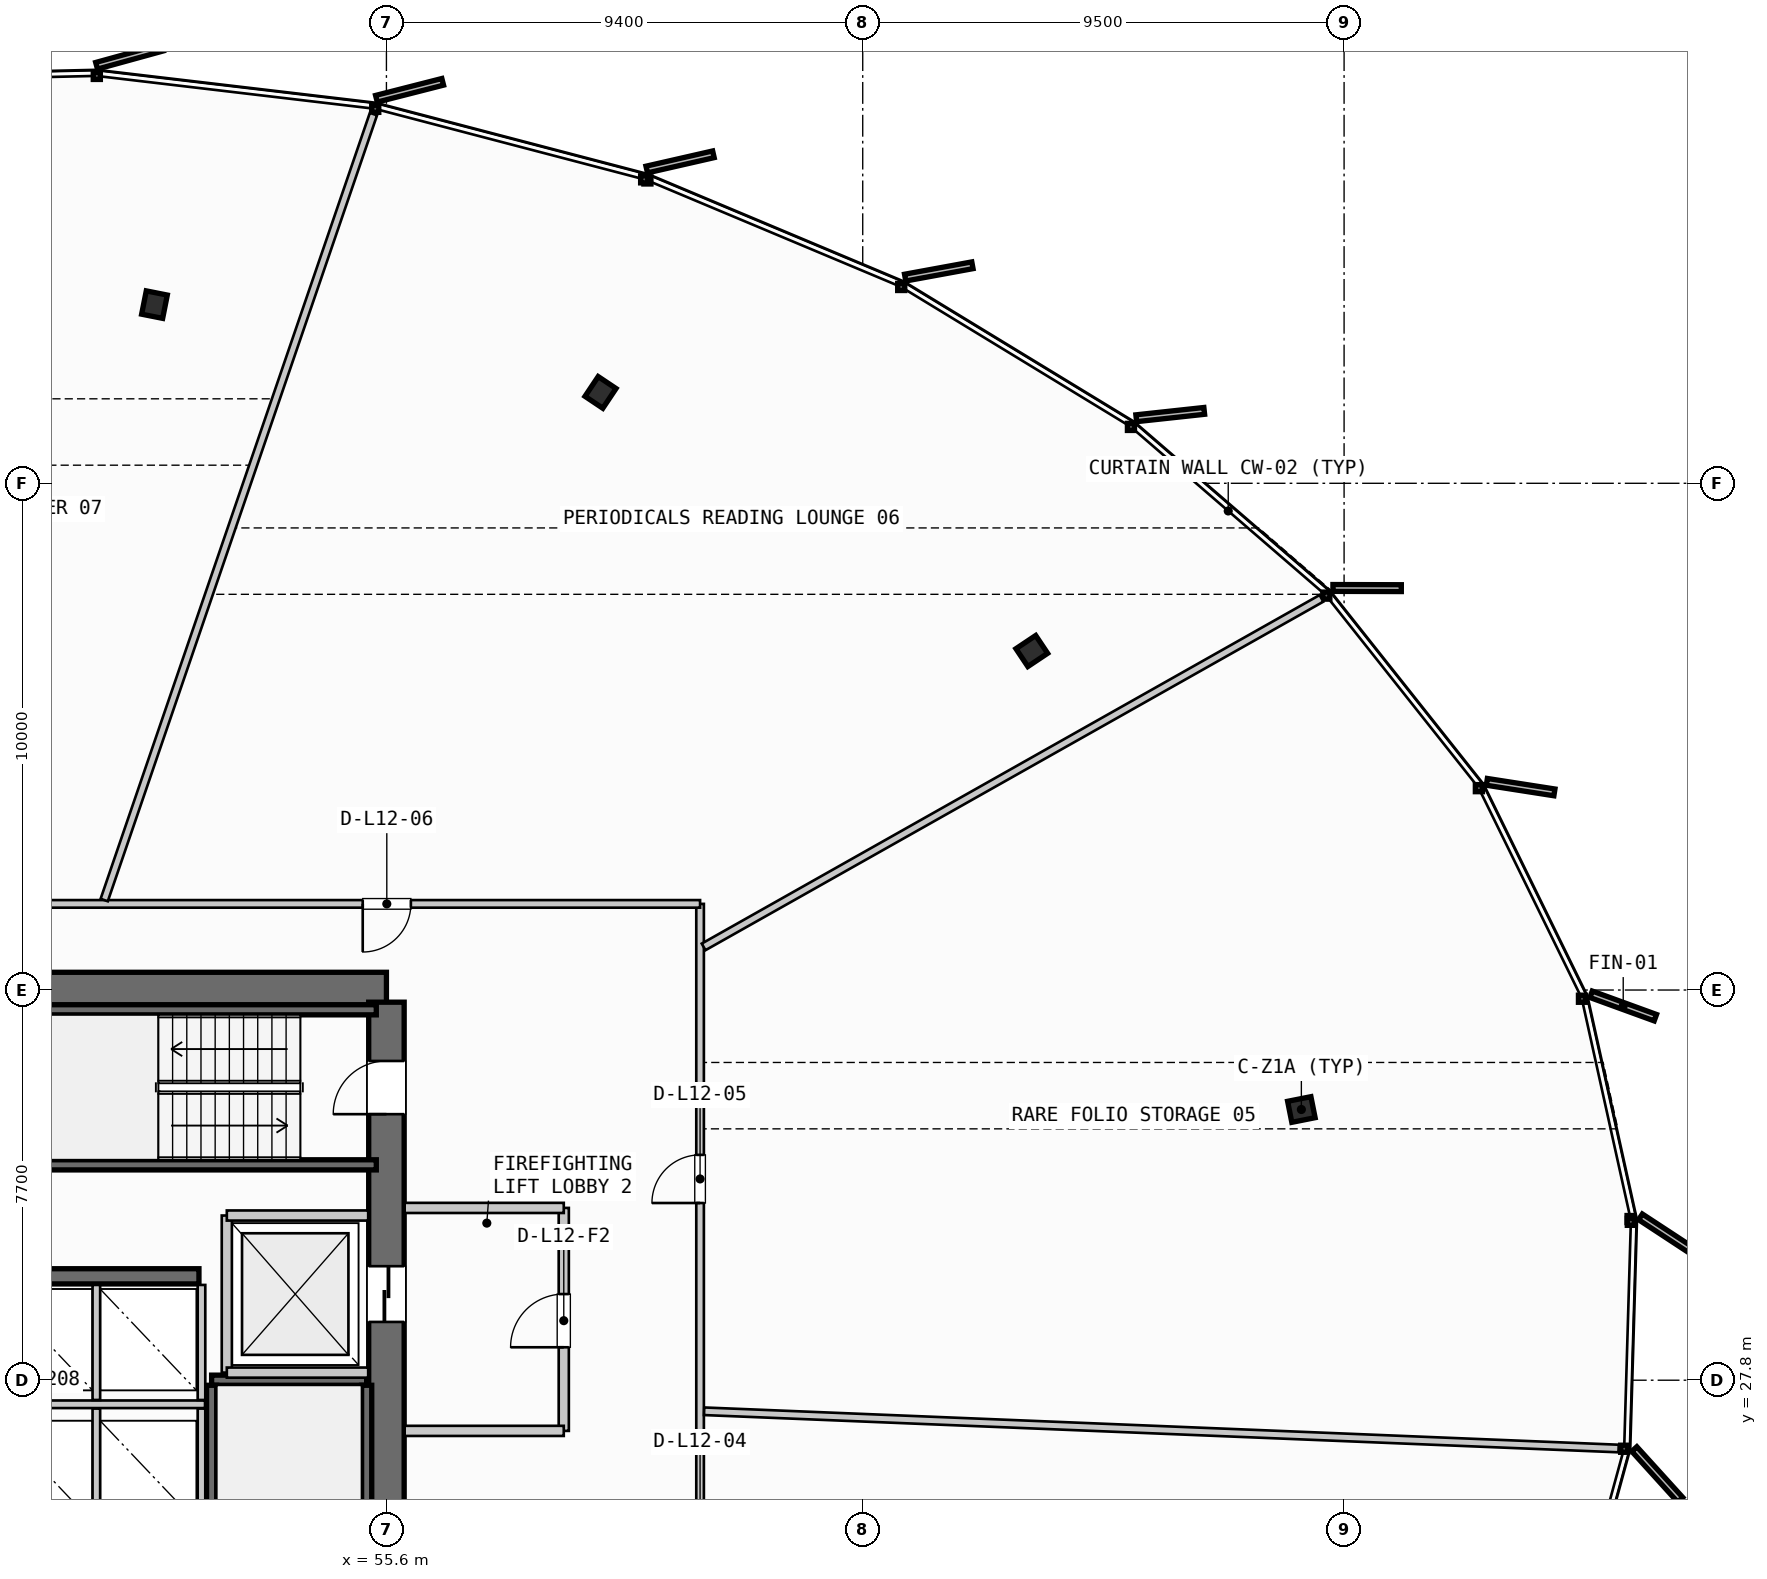
"""IFC4 building model, lengths in metres.
Left out: names, types, materials, properties, quantities, classifications, styles, units other than length and angle.
Written with IfcOpenShell. Run it as: python <this file> out.ifc"""

import sys

from ifc_helpers import new_model, si_unit, direction, frame, frame_2d, origin, origin_2d, place, context, subcontext, project, spatial, rectangle, i_section, extrude, source, transform, mapped, element, fill, save


model = new_model("IFC4")
c1 = context("Model", 3, precision=1e-05, world=origin(), true_north=direction((0.0, 1.0)))
c2 = subcontext(c1, "Body", "Model", "MODEL_VIEW")
j1 = project(units=[si_unit("LENGTHUNIT", "METRE"), si_unit("PLANEANGLEUNIT", "RADIAN")], contexts=[c1])
p1 = place(None, origin())
s1 = spatial("IfcSite", under=j1, at=p1, CompositionType="ELEMENT")
p2 = place(p1, origin())
s2 = spatial("IfcBuilding", under=s1, at=p2, CompositionType="ELEMENT")
p3 = place(p2, frame((0.0, 0.0, 52.4)))
s3 = spatial("IfcBuildingStorey", under=s2, at=p3, CompositionType="ELEMENT", Elevation=52.4)
p4 = place(p3, frame((55.6, 35.5, 0.0), z_axis=(0.0, 0.0, 1.0), x_axis=(-1.0, 0.0, 0.0)))
e1 = element("IfcWall", 1, at=p4, inside=s3, PredefinedType="SHEAR", context=c2, shape_type="SweptSolid", body=[
    extrude(rectangle(XDim=17.6, YDim=0.7, at=frame_2d((8.8, 0.0))), origin(), (0.0, 0.0, 1.0), 3.55),
])
p5 = place(p4, frame((8.05, 0.0, 0.0)))
e2 = element("IfcOpeningElement", 2, at=p5, cuts=e1, PredefinedType="OPENING", context=c2, shape_type="SweptSolid", body=[
    extrude(rectangle(XDim=1.5, YDim=2.2, at=frame_2d((0.75, 1.1))), frame((0.0, 0.36, 0.0), z_axis=(0.0, -1.0, 0.0), x_axis=(1.0, 0.0, 0.0)), (0.0, 0.0, 1.0), 0.72),
])
p6 = place(p4, frame((14.95, 0.0, 0.0)))
e3 = element("IfcOpeningElement", 3, at=p6, cuts=e1, PredefinedType="OPENING", context=c2, shape_type="SweptSolid", body=[
    extrude(rectangle(XDim=1.4, YDim=2.3, at=frame_2d((0.7, 1.15))), frame((0.0, 0.36, 0.0), z_axis=(0.0, -1.0, 0.0), x_axis=(1.0, 0.0, 0.0)), (0.0, 0.0, 1.0), 0.72),
])
p7 = place(p4, frame((12.3, 0.0, 0.0)))
e4 = element("IfcOpeningElement", 4, at=p7, cuts=e1, PredefinedType="OPENING", context=c2, shape_type="SweptSolid", body=[
    extrude(rectangle(XDim=0.95, YDim=2.15, at=frame_2d((0.475, 1.075))), frame((0.0, 0.36, 0.0), z_axis=(0.0, -1.0, 0.0), x_axis=(1.0, 0.0, 0.0)), (0.0, 0.0, 1.0), 0.72),
])
p8 = place(p4, frame((10.2, 0.0, 0.0)))
e5 = element("IfcOpeningElement", 5, at=p8, cuts=e1, PredefinedType="OPENING", context=c2, shape_type="SweptSolid", body=[
    extrude(rectangle(XDim=0.9, YDim=2.15, at=frame_2d((0.45, 1.075))), frame((0.0, 0.36, 0.0), z_axis=(0.0, -1.0, 0.0), x_axis=(1.0, 0.0, 0.0)), (0.0, 0.0, 1.0), 0.72),
])
p9 = place(p3, frame((55.6, 20.34, 0.0), z_axis=(0.0, 0.0, 1.0), x_axis=(0.0, 1.0, 0.0)))
e6 = element("IfcWall", 6, at=p9, inside=s3, PredefinedType="SHEAR", context=c2, shape_type="SweptSolid", body=[
    extrude(rectangle(XDim=14.92, YDim=0.7, at=frame_2d((7.46, 0.0))), origin(), (0.0, 0.0, 1.0), 3.55),
])
p10 = place(p9, frame((12.71, 0.0, 0.0)))
e7 = element("IfcOpeningElement", 7, at=p10, cuts=e6, PredefinedType="OPENING", context=c2, shape_type="SweptSolid", body=[
    extrude(rectangle(XDim=1.05, YDim=2.15, at=frame_2d((0.525, 1.075))), frame((0.0, 0.36, 0.0), z_axis=(0.0, -1.0, 0.0), x_axis=(1.0, 0.0, 0.0)), (0.0, 0.0, 1.0), 0.72),
])
p11 = place(p9, frame((8.61, 0.0, 0.0)))
e8 = element("IfcOpeningElement", 8, at=p11, cuts=e6, PredefinedType="OPENING", context=c2, shape_type="SweptSolid", body=[
    extrude(rectangle(XDim=1.1, YDim=2.2, at=frame_2d((0.55, 1.1))), frame((0.0, 0.36, 0.0), z_axis=(0.0, -1.0, 0.0), x_axis=(1.0, 0.0, 0.0)), (0.0, 0.0, 1.0), 0.72),
])
p12 = place(p3, frame((47.65, 29.85, 0.0), z_axis=(0.0, 0.0, 1.0), x_axis=(1.0, 0.0, 0.0)))
e9 = element("IfcWall", 9, at=p12, inside=s3, PredefinedType="SHEAR", context=c2, shape_type="SweptSolid", body=[
    extrude(rectangle(XDim=4.25, YDim=0.3, at=frame_2d((2.125, 0.0))), origin(), (0.0, 0.0, 1.0), 3.55),
])
m1 = source(origin(), c2, "Body", "SweptSolid", [
    extrude(i_section(OverallWidth=0.423, OverallDepth=0.469, WebThickness=0.051, FlangeThickness=0.081, FilletRadius=0.015, at=origin_2d()), origin(), (0.0, 0.0, 1.0), 3.55),
])
for number, where, z_axis, x_axis in (
    (10, (73.657, 33.142, 0.0), (0.0, 0.0, 1.0), (0.981, 0.195, 0.0)),
    (11, (68.336, 42.19, 0.0), (0.0, 0.0, 1.0), (0.831, 0.556, 0.0)),
    (12, (59.825, 47.293, 0.0), (0.0, 0.0, 1.0), (0.556, 0.831, 0.0)),
    (13, (51.022, 49.026, 0.0), (0.0, 0.0, 1.0), (0.195, 0.981, 0.0)),
):
    element("IfcColumn", number, at=place(p3, frame(where, z_axis=z_axis, x_axis=x_axis)), inside=s3, PredefinedType="COLUMN", context=c2, shape_type="MappedRepresentation", body=[
        mapped(m1, transform((0.0, 0.0, 0.0), scale=1.0)),
    ])
p13 = place(p3, frame((52.15, 27.8, 0.0), z_axis=(0.0, 0.0, 1.0), x_axis=(1.0, 0.0, 0.0)))
e14 = element("IfcWall", 14, at=p13, inside=s3, PredefinedType="SHEAR", context=c2, shape_type="SweptSolid", body=[
    extrude(rectangle(XDim=3.06, YDim=0.2, at=frame_2d((1.53, 0.0))), origin(), (0.0, 0.0, 1.0), 3.55),
])
for number, where, z_axis, x_axis in (
    (15, (55.21, 27.7, 0.0), (0.0, 0.0, 1.0), (0.0, -1.0, 0.0)),
    (16, (52.15, 20.35, 0.0), (0.0, 0.0, 1.0), (0.0, 1.0, 0.0)),
    (17, (48.05, 35.11, 0.0), (0.0, 0.0, 1.0), (1.0, 0.0, 0.0)),
    (18, (55.4, 32.05, 0.0), (0.0, 0.0, 1.0), (-1.0, 0.0, 0.0)),
):
    element("IfcWall", number, at=place(p3, frame(where, z_axis=z_axis, x_axis=x_axis)), inside=s3, PredefinedType="SHEAR", context=c2, shape_type="SweptSolid", body=[
        extrude(rectangle(XDim=7.35, YDim=0.2, at=frame_2d((3.675, 0.0))), origin(), (0.0, 0.0, 1.0), 3.55),
    ])
p14 = place(p3, frame((52.45, 27.95, 0.0), z_axis=(0.0, 0.0, 1.0), x_axis=(0.0, 1.0, 0.0)))
e19 = element("IfcWall", 19, at=p14, inside=s3, PredefinedType="PARTITIONING", context=c2, shape_type="SweptSolid", body=[
    extrude(rectangle(XDim=3.1, YDim=0.2, at=frame_2d((1.55, 0.0))), origin(), (0.0, 0.0, 1.0), 2.645),
])
for number, where, z_axis, x_axis in (
    (20, (52.45, 27.95, 0.0), (0.0, 0.0, 1.0), (1.0, 0.0, 0.0)),
    (21, (52.45, 31.05, 0.0), (0.0, 0.0, 1.0), (1.0, 0.0, 0.0)),
):
    element("IfcWall", number, at=place(p3, frame(where, z_axis=z_axis, x_axis=x_axis)), inside=s3, PredefinedType="PARTITIONING", context=c2, shape_type="SweptSolid", body=[
        extrude(rectangle(XDim=2.79, YDim=0.2, at=frame_2d((1.395, 0.0))), origin(), (0.0, 0.0, 1.0), 2.645),
    ])
p15 = place(p3, frame((59.1, 26.8, 0.0), z_axis=(0.0, 0.0, 1.0), x_axis=(0.0, 1.0, 0.0)))
e22 = element("IfcWall", 22, at=p15, inside=s3, PredefinedType="PARTITIONING", context=c2, shape_type="SweptSolid", body=[
    extrude(rectangle(XDim=4.4, YDim=0.2, at=frame_2d((2.2, 0.0))), origin(), (0.0, 0.0, 1.0), 2.645),
])
p16 = place(p15, frame((1.65, 0.0, 0.0)))
e23 = element("IfcOpeningElement", 23, at=p16, cuts=e22, PredefinedType="OPENING", context=c2, shape_type="SweptSolid", body=[
    extrude(rectangle(XDim=1.05, YDim=2.15, at=frame_2d((0.525, 1.075))), frame((0.0, 0.11, 0.0), z_axis=(0.0, -1.0, 0.0), x_axis=(1.0, 0.0, 0.0)), (0.0, 0.0, 1.0), 0.22),
])
for number, where, z_axis, x_axis in (
    (24, (55.96, 26.8, 0.0), (0.0, 0.0, 1.0), (1.0, 0.0, 0.0)),
    (25, (55.96, 31.2, 0.0), (0.0, 0.0, 1.0), (1.0, 0.0, 0.0)),
):
    element("IfcWall", number, at=place(p3, frame(where, z_axis=z_axis, x_axis=x_axis)), inside=s3, PredefinedType="PARTITIONING", context=c2, shape_type="SweptSolid", body=[
        extrude(rectangle(XDim=3.14, YDim=0.2, at=frame_2d((1.57, 0.0))), origin(), (0.0, 0.0, 1.0), 2.645),
    ])
p17 = place(p3, frame((47.7, 27.325, 0.0), z_axis=(0.0, 0.0, 1.0), x_axis=(1.0, 0.0, 0.0)))
e26 = element("IfcWall", 26, at=p17, inside=s3, PredefinedType="PARTITIONING", context=c2, shape_type="SweptSolid", body=[
    extrude(rectangle(XDim=4.32, YDim=0.15, at=frame_2d((2.16, 0.0))), origin(), (0.0, 0.0, 1.0), 2.645),
])
for number, where, z_axis, x_axis in (
    (27, (49.875, 24.92, 0.0), (0.0, 0.0, 1.0), (0.0, 1.0, 0.0)),
    (28, (51.95, 24.92, 0.0), (0.0, 0.0, 1.0), (0.0, 1.0, 0.0)),
):
    element("IfcWall", number, at=place(p3, frame(where, z_axis=z_axis, x_axis=x_axis)), inside=s3, PredefinedType="PARTITIONING", context=c2, shape_type="SweptSolid", body=[
        extrude(rectangle(XDim=2.32, YDim=0.15, at=frame_2d((1.16, 0.0))), origin(), (0.0, 0.0, 1.0), 2.645),
    ])
for number, where, z_axis, x_axis in (
    (29, (49.875, 27.41, 0.0), (0.0, 0.0, 1.0), (0.0, 1.0, 0.0)),
    (30, (51.95, 27.41, 0.0), (0.0, 0.0, 1.0), (0.0, 1.0, 0.0)),
):
    element("IfcWall", number, at=place(p3, frame(where, z_axis=z_axis, x_axis=x_axis)), inside=s3, PredefinedType="PARTITIONING", context=c2, shape_type="SweptSolid", body=[
        extrude(rectangle(XDim=2.27, YDim=0.15, at=frame_2d((1.135, 0.0))), origin(), (0.0, 0.0, 1.0), 2.645),
    ])
p18 = place(p3, frame((61.79, 17.98, 0.0), z_axis=(0.0, 0.0, 1.0), x_axis=(0.0, 1.0, 0.0)))
e31 = element("IfcWall", 31, at=p18, inside=s3, PredefinedType="PARTITIONING", context=c2, shape_type="SweptSolid", body=[
    extrude(rectangle(XDim=19.22, YDim=0.15, at=frame_2d((9.61, 0.0))), origin(), (0.0, 0.0, 1.0), 2.645),
])
p19 = place(p18, frame((2.175, 0.0, 0.0)))
e32 = element("IfcOpeningElement", 32, at=p19, cuts=e31, PredefinedType="OPENING", context=c2, shape_type="SweptSolid", body=[
    extrude(rectangle(XDim=0.95, YDim=2.15, at=frame_2d((0.475, 1.075))), frame((0.0, 0.085, 0.0), z_axis=(0.0, -1.0, 0.0), x_axis=(1.0, 0.0, 0.0)), (0.0, 0.0, 1.0), 0.17),
])
p20 = place(p18, frame((6.482, 0.0, 0.0)))
e33 = element("IfcOpeningElement", 33, at=p20, cuts=e31, PredefinedType="OPENING", context=c2, shape_type="SweptSolid", body=[
    extrude(rectangle(XDim=0.95, YDim=2.15, at=frame_2d((0.475, 1.075))), frame((0.0, 0.085, 0.0), z_axis=(0.0, -1.0, 0.0), x_axis=(1.0, 0.0, 0.0)), (0.0, 0.0, 1.0), 0.17),
])
p21 = place(p18, frame((13.317, 0.0, 0.0)))
e34 = element("IfcOpeningElement", 34, at=p21, cuts=e31, PredefinedType="OPENING", context=c2, shape_type="SweptSolid", body=[
    extrude(rectangle(XDim=0.95, YDim=2.15, at=frame_2d((0.475, 1.075))), frame((0.0, 0.085, 0.0), z_axis=(0.0, -1.0, 0.0), x_axis=(1.0, 0.0, 0.0)), (0.0, 0.0, 1.0), 0.17),
])
p22 = place(p3, frame((61.79, 37.2, 0.0), z_axis=(0.0, 0.0, 1.0), x_axis=(-1.0, 0.0, 0.0)))
e35 = element("IfcWall", 35, at=p22, inside=s3, PredefinedType="PARTITIONING", context=c2, shape_type="SweptSolid", body=[
    extrude(rectangle(XDim=29.98, YDim=0.15, at=frame_2d((14.99, 0.0))), origin(), (0.0, 0.0, 1.0), 2.645),
])
p23 = place(p22, frame((5.708, 0.0, 0.0)))
e36 = element("IfcOpeningElement", 36, at=p23, cuts=e35, PredefinedType="OPENING", context=c2, shape_type="SweptSolid", body=[
    extrude(rectangle(XDim=0.95, YDim=2.15, at=frame_2d((0.475, 1.075))), frame((0.0, 0.085, 0.0), z_axis=(0.0, -1.0, 0.0), x_axis=(1.0, 0.0, 0.0)), (0.0, 0.0, 1.0), 0.17),
])
p24 = place(p22, frame((14.397, 0.0, 0.0)))
e37 = element("IfcOpeningElement", 37, at=p24, cuts=e35, PredefinedType="OPENING", context=c2, shape_type="SweptSolid", body=[
    extrude(rectangle(XDim=0.95, YDim=2.15, at=frame_2d((0.475, 1.075))), frame((0.0, 0.085, 0.0), z_axis=(0.0, -1.0, 0.0), x_axis=(1.0, 0.0, 0.0)), (0.0, 0.0, 1.0), 0.17),
])
p25 = place(p22, frame((23.206, 0.0, 0.0)))
e38 = element("IfcOpeningElement", 38, at=p25, cuts=e35, PredefinedType="OPENING", context=c2, shape_type="SweptSolid", body=[
    extrude(rectangle(XDim=0.95, YDim=2.15, at=frame_2d((0.475, 1.075))), frame((0.0, 0.085, 0.0), z_axis=(0.0, -1.0, 0.0), x_axis=(1.0, 0.0, 0.0)), (0.0, 0.0, 1.0), 0.17),
])
p26 = place(p3, frame((61.87, 27.187, 0.0), z_axis=(0.0, 0.0, 1.0), x_axis=(0.999170972955, -0.040710770123, 0.0)))
e39 = element("IfcWall", 39, at=p26, inside=s3, PredefinedType="PARTITIONING", context=c2, shape_type="SweptSolid", body=[
    extrude(rectangle(XDim=18.063, YDim=0.15, at=frame_2d((9.031, 0.0))), origin(), (0.0, 0.0, 1.0), 2.645),
])
p27 = place(p3, frame((61.86, 36.351, 0.0), z_axis=(0.0, 0.0, 1.0), x_axis=(0.870994158109, 0.491293371153, 0.0)))
e40 = element("IfcWall", 40, at=p27, inside=s3, PredefinedType="PARTITIONING", context=c2, shape_type="SweptSolid", body=[
    extrude(rectangle(XDim=14.0, YDim=0.15, at=frame_2d((7.0, 0.0))), origin(), (0.0, 0.0, 1.0), 2.645),
])
p28 = place(p3, frame((50.03, 37.276, 0.0), z_axis=(0.0, 0.0, 1.0), x_axis=(0.324074949721, 0.946031409079, 0.0)))
e41 = element("IfcWall", 41, at=p28, inside=s3, PredefinedType="PARTITIONING", context=c2, shape_type="SweptSolid", body=[
    extrude(rectangle(XDim=16.395, YDim=0.15, at=frame_2d((8.198, 0.0))), origin(), (0.0, 0.0, 1.0), 2.645),
])
m2 = source(origin(), c2, "Body", "SweptSolid", [
    extrude(rectangle(XDim=1.05, YDim=2.15, at=frame_2d((0.525, 1.075))), frame((0.0, 0.025, 0.0), z_axis=(0.0, -1.0, 0.0), x_axis=(1.0, 0.0, 0.0)), (0.0, 0.0, 1.0), 0.05),
])
p29 = place(p10, origin())
e42 = element("IfcDoor", 42, at=p29, inside=s3, OperationType="SINGLE_SWING_LEFT", PredefinedType="DOOR", context=c2, shape_type="MappedRepresentation", body=[
    mapped(m2, transform((0.0, 0.0, 0.0), scale=1.0)),
])
fill(e7, e42)
m3 = source(origin(), c2, "Body", "SweptSolid", [
    extrude(rectangle(XDim=1.1, YDim=2.2, at=frame_2d((0.55, 1.1))), frame((0.0, 0.025, 0.0), z_axis=(0.0, -1.0, 0.0), x_axis=(1.0, 0.0, 0.0)), (0.0, 0.0, 1.0), 0.05),
])
p30 = place(p11, origin())
e43 = element("IfcDoor", 43, at=p30, inside=s3, OperationType="SLIDING_TO_RIGHT", PredefinedType="DOOR", context=c2, shape_type="MappedRepresentation", body=[
    mapped(m3, transform((0.0, 0.0, 0.0), scale=1.0)),
])
fill(e8, e43)
p31 = place(p16, origin())
e44 = element("IfcDoor", 44, at=p31, inside=s3, OperationType="SINGLE_SWING_LEFT", PredefinedType="DOOR", context=c2, shape_type="MappedRepresentation", body=[
    mapped(m2, transform((0.0, 0.0, 0.0), scale=1.0)),
])
fill(e23, e44)
m4 = source(origin(), c2, "Body", "SweptSolid", [
    extrude(rectangle(XDim=0.95, YDim=2.15, at=frame_2d((0.475, 1.075))), frame((0.0, 0.025, 0.0), z_axis=(0.0, -1.0, 0.0), x_axis=(1.0, 0.0, 0.0)), (0.0, 0.0, 1.0), 0.05),
])
p32 = place(p21, origin())
e45 = element("IfcDoor", 45, at=p32, inside=s3, OperationType="SINGLE_SWING_LEFT", PredefinedType="DOOR", context=c2, shape_type="MappedRepresentation", body=[
    mapped(m4, transform((0.0, 0.0, 0.0), scale=1.0)),
])
fill(e34, e45)
p33 = place(p23, origin())
e46 = element("IfcDoor", 46, at=p33, inside=s3, OperationType="SINGLE_SWING_RIGHT", PredefinedType="DOOR", context=c2, shape_type="MappedRepresentation", body=[
    mapped(m4, transform((0.0, 0.0, 0.0), scale=1.0)),
])
fill(e36, e46)
save(model, sys.argv[1])
